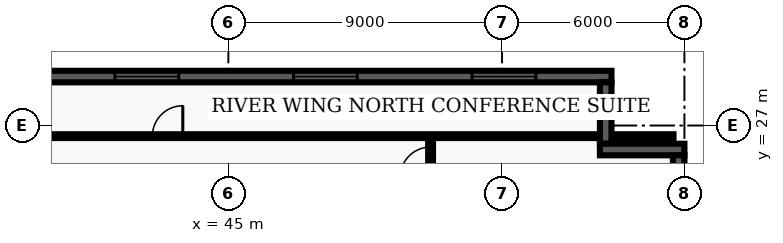
"""IFC4 building model, lengths in metres.
Left out: names, types, materials, properties, quantities, classifications, styles, units other than length and angle.
Written with IfcOpenShell. Run it as: python <this file> out.ifc"""

import sys

from ifc_helpers import new_model, entity, si_unit, converted_unit, direction, frame, origin_with_axes, origin_2d_with_axis, place, context, subcontext, project, spatial, polyline, rectangle, outline, extrude, element, fill, save


model = new_model("IFC4")
c1 = context("Model", 3, precision=1e-05, world=origin_with_axes(), true_north=direction((0.0, 1.0)))
c2 = subcontext(c1, "Body", "Model", "MODEL_VIEW")
j1 = project(units=[si_unit("LENGTHUNIT", "METRE"), converted_unit("PLANEANGLEUNIT", "DEGREE", entity("IfcPlaneAngleMeasure", 0.017), si_unit("PLANEANGLEUNIT", "RADIAN"), dimensions=[0, 0, 0, 0, 0, 0, 0])], contexts=[c1])
p1 = place(None, origin_with_axes())
s1 = spatial("IfcSite", under=j1, at=p1, CompositionType="ELEMENT")
p2 = place(p1, origin_with_axes())
s2 = spatial("IfcBuilding", under=s1, at=p2, CompositionType="ELEMENT")
p3 = place(p2, frame((0.0, 0.0, 108.6), z_axis=(0.0, 0.0, 1.0), x_axis=(1.0, 0.0, 0.0)))
s3 = spatial("IfcBuildingStorey", under=s2, at=p3, CompositionType="ELEMENT", Elevation=108.6)
p4 = place(p3, frame((51.65, 7.85, 0.0), z_axis=(0.0, 0.0, 1.0), x_axis=(0.0, 1.0, 0.0)))
e1 = element("IfcWall", 1, at=p4, inside=s3, PredefinedType="PARTITIONING", context=c2, shape_type="SweptSolid", body=[
    extrude(outline(polyline([(0.0, -0.08), (18.8, -0.08), (18.8, 0.08), (0.0, 0.08), (0.0, -0.08)])), origin_with_axes(), (0.0, 0.0, 1.0), 2.7),
])
p5 = place(p4, frame((4.294, 0.0, 0.0), z_axis=(0.0, 0.0, 1.0), x_axis=(1.0, 0.0, 0.0)))
e2 = element("IfcOpeningElement", 2, at=p5, cuts=e1, PredefinedType="OPENING", context=c2, shape_type="SweptSolid", body=[
    extrude(rectangle(XDim=1.0, YDim=0.18, at=origin_2d_with_axis()), origin_with_axes(), (0.0, 0.0, 1.0), 2.15),
])
p6 = place(p4, frame((11.585, 0.0, 0.0), z_axis=(0.0, 0.0, 1.0), x_axis=(1.0, 0.0, 0.0)))
e3 = element("IfcOpeningElement", 3, at=p6, cuts=e1, PredefinedType="OPENING", context=c2, shape_type="SweptSolid", body=[
    extrude(rectangle(XDim=1.0, YDim=0.18, at=origin_2d_with_axis()), origin_with_axes(), (0.0, 0.0, 1.0), 2.15),
])
p7 = place(p4, frame((17.941, 0.0, 0.0), z_axis=(0.0, 0.0, 1.0), x_axis=(1.0, 0.0, 0.0)))
e4 = element("IfcOpeningElement", 4, at=p7, cuts=e1, PredefinedType="OPENING", context=c2, shape_type="SweptSolid", body=[
    extrude(rectangle(XDim=1.0, YDim=0.18, at=origin_2d_with_axis()), origin_with_axes(), (0.0, 0.0, 1.0), 2.15),
])
p8 = place(p3, frame((38.76, 26.65, 0.0), z_axis=(0.0, 0.0, 1.0), x_axis=(1.0, 0.0, 0.0)))
e5 = element("IfcWall", 5, at=p8, inside=s3, PredefinedType="PARTITIONING", context=c2, shape_type="SweptSolid", body=[
    extrude(outline(polyline([(0.0, -0.062), (20.88, -0.062), (20.88, 0.062), (0.0, 0.062), (0.0, -0.062)])), origin_with_axes(), (0.0, 0.0, 1.0), 2.7),
])
p9 = place(p8, frame((4.24, 0.0, 0.0), z_axis=(0.0, 0.0, 1.0), x_axis=(1.0, 0.0, 0.0)))
e6 = element("IfcOpeningElement", 6, at=p9, cuts=e5, PredefinedType="OPENING", context=c2, shape_type="SweptSolid", body=[
    extrude(rectangle(XDim=1.0, YDim=0.145, at=origin_2d_with_axis()), origin_with_axes(), (0.0, 0.0, 1.0), 2.15),
])
p10 = place(p3, frame((38.78, 28.61, 0.0), z_axis=(0.0, 0.0, 1.0), x_axis=(1.0, 0.0, 0.0)))
e7 = element("IfcWall", 7, at=p10, inside=s3, PredefinedType="SOLIDWALL", context=c2, shape_type="SweptSolid", body=[
    extrude(outline(polyline([(0.0, -0.19), (18.82, -0.19), (18.82, 0.19), (0.0, 0.19), (0.0, -0.19)])), origin_with_axes(), (0.0, 0.0, 1.0), 3.66),
])
p11 = place(p10, frame((3.537, 0.0, 0.45), z_axis=(0.0, 0.0, 1.0), x_axis=(1.0, 0.0, 0.0)))
e8 = element("IfcOpeningElement", 8, at=p11, cuts=e7, PredefinedType="OPENING", context=c2, shape_type="SweptSolid", body=[
    extrude(rectangle(XDim=2.1, YDim=0.4, at=origin_2d_with_axis()), origin_with_axes(), (0.0, 0.0, 1.0), 2.2),
])
p12 = place(p10, frame((9.41, 0.0, 0.45), z_axis=(0.0, 0.0, 1.0), x_axis=(1.0, 0.0, 0.0)))
e9 = element("IfcOpeningElement", 9, at=p12, cuts=e7, PredefinedType="OPENING", context=c2, shape_type="SweptSolid", body=[
    extrude(rectangle(XDim=2.1, YDim=0.4, at=origin_2d_with_axis()), origin_with_axes(), (0.0, 0.0, 1.0), 2.2),
])
p13 = place(p10, frame((15.283, 0.0, 0.45), z_axis=(0.0, 0.0, 1.0), x_axis=(1.0, 0.0, 0.0)))
e10 = element("IfcOpeningElement", 10, at=p13, cuts=e7, PredefinedType="OPENING", context=c2, shape_type="SweptSolid", body=[
    extrude(rectangle(XDim=2.1, YDim=0.4, at=origin_2d_with_axis()), origin_with_axes(), (0.0, 0.0, 1.0), 2.2),
])
p14 = place(p3, frame((57.41, 28.42, 0.0), z_axis=(0.0, 0.0, 1.0), x_axis=(0.0, -1.0, 0.0)))
e11 = element("IfcWall", 11, at=p14, inside=s3, PredefinedType="SOLIDWALL", context=c2, shape_type="SweptSolid", body=[
    extrude(outline(polyline([(0.0, -0.19), (2.02, -0.19), (2.02, 0.19), (0.0, 0.19), (0.0, -0.19)])), origin_with_axes(), (0.0, 0.0, 1.0), 3.66),
])
p15 = place(p3, frame((57.22, 26.21, 0.0), z_axis=(0.0, 0.0, 1.0), x_axis=(1.0, 0.0, 0.0)))
e12 = element("IfcWall", 12, at=p15, inside=s3, PredefinedType="SOLIDWALL", context=c2, shape_type="SweptSolid", body=[
    extrude(outline(polyline([(0.0, -0.19), (2.78, -0.19), (2.78, 0.19), (0.0, 0.19), (0.0, -0.19)])), origin_with_axes(), (0.0, 0.0, 1.0), 3.66),
])
p16 = place(p3, frame((59.81, 26.02, 0.0), z_axis=(0.0, 0.0, 1.0), x_axis=(0.0, -1.0, 0.0)))
e13 = element("IfcWall", 13, at=p16, inside=s3, PredefinedType="SOLIDWALL", context=c2, shape_type="SweptSolid", body=[
    extrude(outline(polyline([(0.0, -0.19), (23.62, -0.19), (23.62, 0.19), (0.0, 0.19), (0.0, -0.19)])), origin_with_axes(), (0.0, 0.0, 1.0), 3.66),
])
p17 = place(p16, frame((20.218, 0.0, 0.45), z_axis=(0.0, 0.0, 1.0), x_axis=(1.0, 0.0, 0.0)))
e14 = element("IfcOpeningElement", 14, at=p17, cuts=e13, PredefinedType="OPENING", context=c2, shape_type="SweptSolid", body=[
    extrude(rectangle(XDim=2.1, YDim=0.4, at=origin_2d_with_axis()), origin_with_axes(), (0.0, 0.0, 1.0), 2.2),
])
p18 = place(p8, frame((4.24, 0.0, 0.0), z_axis=(0.0, 0.0, 1.0), x_axis=(1.0, 0.0, 0.0)))
e15 = element("IfcDoor", 15, at=p18, inside=s3, OperationType="SINGLE_SWING_RIGHT", PredefinedType="DOOR", context=c2, shape_type="SweptSolid", body=[
    extrude(rectangle(XDim=1.0, YDim=0.075, at=origin_2d_with_axis()), origin_with_axes(), (0.0, 0.0, 1.0), 2.15),
])
fill(e6, e15)
p19 = place(p4, frame((17.941, 0.0, 0.0), z_axis=(0.0, 0.0, 1.0), x_axis=(1.0, 0.0, 0.0)))
e16 = element("IfcDoor", 16, at=p19, inside=s3, OperationType="SINGLE_SWING_LEFT", PredefinedType="DOOR", context=c2, shape_type="SweptSolid", body=[
    extrude(rectangle(XDim=1.0, YDim=0.09, at=origin_2d_with_axis()), origin_with_axes(), (0.0, 0.0, 1.0), 2.15),
])
fill(e4, e16)
p20 = place(p10, frame((3.537, 0.0, 0.45), z_axis=(0.0, 0.0, 1.0), x_axis=(1.0, 0.0, 0.0)))
e17 = element("IfcWindow", 17, at=p20, inside=s3, PredefinedType="WINDOW", context=c2, shape_type="SweptSolid", body=[
    extrude(rectangle(XDim=2.1, YDim=0.09, at=origin_2d_with_axis()), origin_with_axes(), (0.0, 0.0, 1.0), 2.2),
])
fill(e8, e17)
p21 = place(p10, frame((9.41, 0.0, 0.45), z_axis=(0.0, 0.0, 1.0), x_axis=(1.0, 0.0, 0.0)))
e18 = element("IfcWindow", 18, at=p21, inside=s3, PredefinedType="WINDOW", context=c2, shape_type="SweptSolid", body=[
    extrude(rectangle(XDim=2.1, YDim=0.09, at=origin_2d_with_axis()), origin_with_axes(), (0.0, 0.0, 1.0), 2.2),
])
fill(e9, e18)
p22 = place(p10, frame((15.283, 0.0, 0.45), z_axis=(0.0, 0.0, 1.0), x_axis=(1.0, 0.0, 0.0)))
e19 = element("IfcWindow", 19, at=p22, inside=s3, PredefinedType="WINDOW", context=c2, shape_type="SweptSolid", body=[
    extrude(rectangle(XDim=2.1, YDim=0.09, at=origin_2d_with_axis()), origin_with_axes(), (0.0, 0.0, 1.0), 2.2),
])
fill(e10, e19)
save(model, sys.argv[1])
